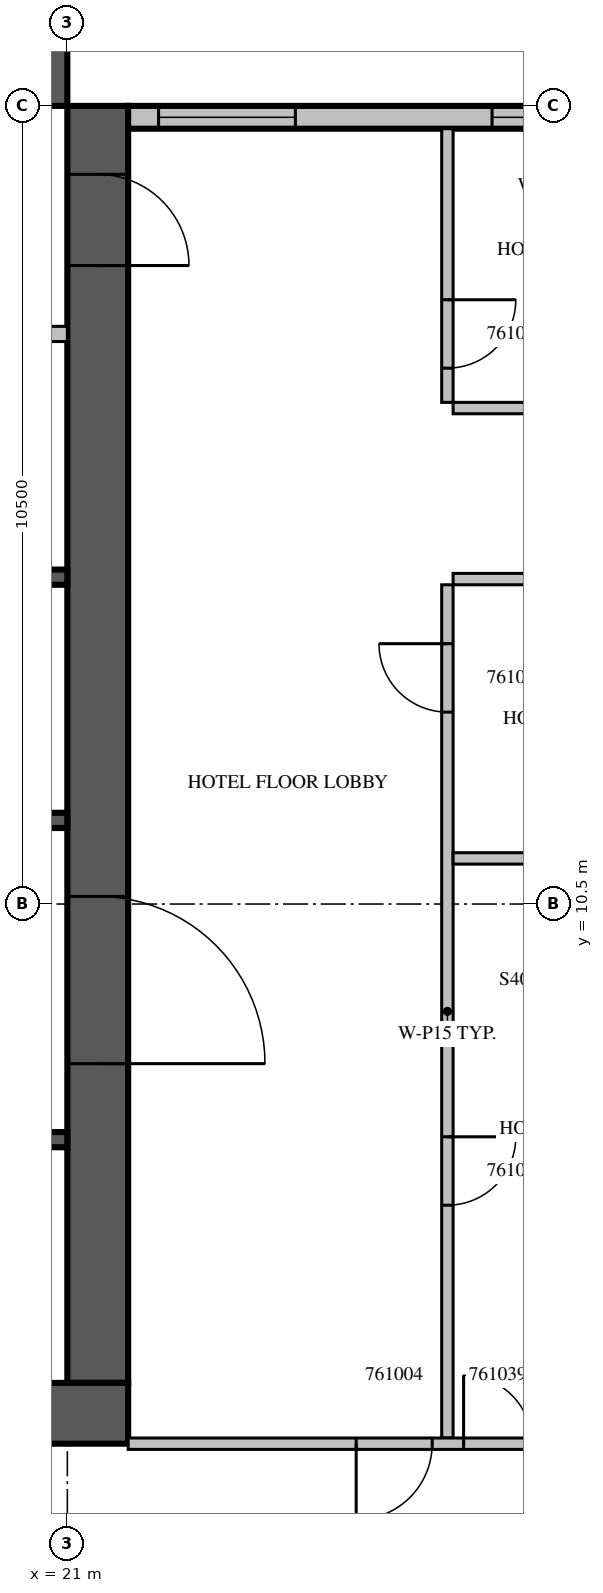
"""IFC4 building model, lengths in metres.
Left out: names, types, materials, properties, quantities, classifications, styles, units other than length and angle.
Written with IfcOpenShell. Run it as: python <this file> out.ifc"""

import sys

from ifc_helpers import new_model, si_unit, direction, frame, frame_2d, origin, place, context, subcontext, project, spatial, rectangle, extrude, source, transform, mapped, element, fill, save


model = new_model("IFC4")
c1 = context("Model", 3, precision=1e-05, world=origin(), true_north=direction((0.0, 1.0)))
c2 = subcontext(c1, "Body", "Model", "MODEL_VIEW")
j1 = project(units=[si_unit("LENGTHUNIT", "METRE"), si_unit("PLANEANGLEUNIT", "RADIAN")], contexts=[c1])
p1 = place(None, origin())
s1 = spatial("IfcSite", under=j1, at=p1, CompositionType="ELEMENT")
p2 = place(p1, origin())
s2 = spatial("IfcBuilding", under=s1, at=p2, CompositionType="ELEMENT")
p3 = place(p2, frame((0.0, 0.0, 265.2)))
s3 = spatial("IfcBuildingStorey", under=s2, at=p3, CompositionType="ELEMENT", Elevation=265.2)
m1 = source(origin(), c2, "Body", "SweptSolid", [
    extrude(rectangle(XDim=16.8, YDim=0.8, at=frame_2d((8.4, 0.0))), origin(), (0.0, 0.0, 1.0), 3.8),
])
p4 = place(p3, frame((21.4, 4.2, 0.0), z_axis=(0.0, 0.0, 1.0), x_axis=(0.0, 1.0, 0.0)))
e1 = element("IfcWall", 1, at=p4, inside=s3, PredefinedType="SHEAR", context=c2, shape_type="MappedRepresentation", body=[
    mapped(m1, transform((0.0, 0.0, 0.0), scale=1.0)),
])
m2 = source(origin(), c2, "Body", "SweptSolid", [
    extrude(rectangle(XDim=2.2, YDim=2.1, at=frame_2d((1.1, 1.05))), frame((0.0, 0.41, 0.0), z_axis=(0.0, -1.0, 0.0), x_axis=(1.0, 0.0, 0.0)), (0.0, 0.0, 1.0), 0.82),
])
p5 = place(p4, frame((4.2, 0.0, 0.0)))
e2 = element("IfcOpeningElement", 2, at=p5, cuts=e1, PredefinedType="OPENING", context=c2, shape_type="MappedRepresentation", body=[
    mapped(m2, transform((0.0, 0.0, 0.0), scale=1.0)),
])
m3 = source(origin(), c2, "Body", "SweptSolid", [
    extrude(rectangle(XDim=1.2, YDim=2.1, at=frame_2d((0.6, 1.05))), frame((0.0, 0.41, 0.0), z_axis=(0.0, -1.0, 0.0), x_axis=(1.0, 0.0, 0.0)), (0.0, 0.0, 1.0), 0.82),
])
p6 = place(p4, frame((14.7, 0.0, 0.0)))
e3 = element("IfcOpeningElement", 3, at=p6, cuts=e1, PredefinedType="OPENING", context=c2, shape_type="MappedRepresentation", body=[
    mapped(m3, transform((0.0, 0.0, 0.0), scale=1.0)),
])
m4 = source(origin(), c2, "Body", "SweptSolid", [
    extrude(rectangle(XDim=17.6, YDim=0.8, at=frame_2d((8.8, 0.0))), origin(), (0.0, 0.0, 1.0), 3.8),
])
p7 = place(p3, frame((4.2, 3.8, 0.0), z_axis=(0.0, 0.0, 1.0), x_axis=(1.0, 0.0, 0.0)))
e4 = element("IfcWall", 4, at=p7, inside=s3, PredefinedType="SHEAR", context=c2, shape_type="MappedRepresentation", body=[
    mapped(m4, transform((0.0, 0.0, 0.0), scale=1.0)),
])
m5 = source(origin(), c2, "Body", "SweptSolid", [
    extrude(rectangle(XDim=0.9, YDim=2.1, at=frame_2d((0.45, 1.05))), frame((0.0, 0.41, 0.0), z_axis=(0.0, -1.0, 0.0), x_axis=(1.0, 0.0, 0.0)), (0.0, 0.0, 1.0), 0.82),
])
p8 = place(p7, frame((12.75, 0.0, 0.0)))
e5 = element("IfcOpeningElement", 5, at=p8, cuts=e4, PredefinedType="OPENING", context=c2, shape_type="MappedRepresentation", body=[
    mapped(m5, transform((0.0, 0.0, 0.0), scale=1.0)),
])
p9 = place(p3, frame((4.2, 21.4, 0.0), z_axis=(0.0, 0.0, 1.0), x_axis=(1.0, 0.0, 0.0)))
e6 = element("IfcWall", 6, at=p9, inside=s3, PredefinedType="SHEAR", context=c2, shape_type="MappedRepresentation", body=[
    mapped(m1, transform((0.0, 0.0, 0.0), scale=1.0)),
])
p10 = place(p9, frame((6.2, 0.0, 0.0)))
e7 = element("IfcOpeningElement", 7, at=p10, cuts=e6, PredefinedType="OPENING", context=c2, shape_type="MappedRepresentation", body=[
    mapped(m3, transform((0.0, 0.0, 0.0), scale=1.0)),
])
m6 = source(origin(), c2, "Body", "SweptSolid", [
    extrude(rectangle(XDim=7.2, YDim=0.3, at=frame_2d((3.6, 0.0))), origin(), (0.0, 0.0, 1.0), 3.4),
])
p11 = place(p3, frame((29.0, 20.85, 0.0), z_axis=(0.0, 0.0, 1.0), x_axis=(-1.0, 0.0, 0.0)))
e8 = element("IfcWall", 8, at=p11, inside=s3, PredefinedType="STANDARD", context=c2, shape_type="MappedRepresentation", body=[
    mapped(m6, transform((0.0, 0.0, 0.0), scale=1.0)),
])
m7 = source(origin(), c2, "Body", "SweptSolid", [
    extrude(rectangle(XDim=1.8, YDim=2.3, at=frame_2d((0.9, 1.15))), frame((0.0, 0.16, 0.0), z_axis=(0.0, -1.0, 0.0), x_axis=(1.0, 0.0, 0.0)), (0.0, 0.0, 1.0), 0.32),
])
p12 = place(p11, frame((0.613, 0.0, 0.6)))
e9 = element("IfcOpeningElement", 9, at=p12, cuts=e8, PredefinedType="OPENING", context=c2, shape_type="MappedRepresentation", body=[
    mapped(m7, transform((0.0, 0.0, 0.0), scale=1.0)),
])
p13 = place(p11, frame((5.0, 0.0, 0.6)))
e10 = element("IfcOpeningElement", 10, at=p13, cuts=e8, PredefinedType="OPENING", context=c2, shape_type="MappedRepresentation", body=[
    mapped(m7, transform((0.0, 0.0, 0.0), scale=1.0)),
])
m8 = source(origin(), c2, "Body", "SweptSolid", [
    extrude(rectangle(XDim=2.4, YDim=0.2, at=frame_2d((1.2, 0.0))), origin(), (0.0, 0.0, 1.0), 3.8),
])
p14 = place(p3, frame((18.6, 7.4, 0.0), z_axis=(0.0, 0.0, 1.0), x_axis=(1.0, 0.0, 0.0)))
e11 = element("IfcWall", 11, at=p14, inside=s3, PredefinedType="SOLIDWALL", context=c2, shape_type="MappedRepresentation", body=[
    mapped(m8, transform((0.0, 0.0, 0.0), scale=1.0)),
])
m9 = source(origin(), c2, "Body", "SweptSolid", [
    extrude(rectangle(XDim=9.6, YDim=0.2, at=frame_2d((4.8, 0.0))), origin(), (0.0, 0.0, 1.0), 3.8),
])
p15 = place(p3, frame((11.4, 11.6, 0.0), z_axis=(0.0, 0.0, 1.0), x_axis=(1.0, 0.0, 0.0)))
e12 = element("IfcWall", 12, at=p15, inside=s3, PredefinedType="SOLIDWALL", context=c2, shape_type="MappedRepresentation", body=[
    mapped(m9, transform((0.0, 0.0, 0.0), scale=1.0)),
])
p16 = place(p3, frame((11.4, 14.8, 0.0), z_axis=(0.0, 0.0, 1.0), x_axis=(1.0, 0.0, 0.0)))
e13 = element("IfcWall", 13, at=p16, inside=s3, PredefinedType="SOLIDWALL", context=c2, shape_type="MappedRepresentation", body=[
    mapped(m9, transform((0.0, 0.0, 0.0), scale=1.0)),
])
m10 = source(origin(), c2, "Body", "SweptSolid", [
    extrude(rectangle(XDim=1.1, YDim=2.1, at=frame_2d((0.55, 1.05))), frame((0.0, 0.11, 0.0), z_axis=(0.0, -1.0, 0.0), x_axis=(1.0, 0.0, 0.0)), (0.0, 0.0, 1.0), 0.22),
])
p17 = place(p16, frame((3.05, 0.0, 0.0)))
e14 = element("IfcOpeningElement", 14, at=p17, cuts=e13, PredefinedType="OPENING", context=c2, shape_type="MappedRepresentation", body=[
    mapped(m10, transform((0.0, 0.0, 0.0), scale=1.0)),
])
p18 = place(p16, frame((5.45, 0.0, 0.0)))
e15 = element("IfcOpeningElement", 15, at=p18, cuts=e13, PredefinedType="OPENING", context=c2, shape_type="MappedRepresentation", body=[
    mapped(m10, transform((0.0, 0.0, 0.0), scale=1.0)),
])
p19 = place(p16, frame((7.85, 0.0, 0.0)))
e16 = element("IfcOpeningElement", 16, at=p19, cuts=e13, PredefinedType="OPENING", context=c2, shape_type="MappedRepresentation", body=[
    mapped(m10, transform((0.0, 0.0, 0.0), scale=1.0)),
])
m11 = source(origin(), c2, "Body", "SweptSolid", [
    extrude(rectangle(XDim=11.45, YDim=0.2, at=frame_2d((5.725, 0.0))), origin(), (0.0, 0.0, 1.0), 3.4),
])
p20 = place(p3, frame((9.55, 18.0, 0.0), z_axis=(0.0, 0.0, 1.0), x_axis=(1.0, 0.0, 0.0)))
e17 = element("IfcWall", 17, at=p20, inside=s3, PredefinedType="PARTITIONING", context=c2, shape_type="MappedRepresentation", body=[
    mapped(m11, transform((0.0, 0.0, 0.0), scale=1.0)),
])
m12 = source(origin(), c2, "Body", "SweptSolid", [
    extrude(rectangle(XDim=0.9, YDim=2.1, at=frame_2d((0.45, 1.05))), frame((0.0, 0.11, 0.0), z_axis=(0.0, -1.0, 0.0), x_axis=(1.0, 0.0, 0.0)), (0.0, 0.0, 1.0), 0.22),
])
p21 = place(p20, frame((0.375, 0.0, 0.0)))
e18 = element("IfcOpeningElement", 18, at=p21, cuts=e17, PredefinedType="OPENING", context=c2, shape_type="MappedRepresentation", body=[
    mapped(m12, transform((0.0, 0.0, 0.0), scale=1.0)),
])
p22 = place(p20, frame((1.7, 0.0, 0.0)))
e19 = element("IfcOpeningElement", 19, at=p22, cuts=e17, PredefinedType="OPENING", context=c2, shape_type="MappedRepresentation", body=[
    mapped(m12, transform((0.0, 0.0, 0.0), scale=1.0)),
])
p23 = place(p20, frame((3.075, 0.0, 0.0)))
e20 = element("IfcOpeningElement", 20, at=p23, cuts=e17, PredefinedType="OPENING", context=c2, shape_type="MappedRepresentation", body=[
    mapped(m12, transform((0.0, 0.0, 0.0), scale=1.0)),
])
p24 = place(p20, frame((7.35, 0.0, 0.0)))
e21 = element("IfcOpeningElement", 21, at=p24, cuts=e17, PredefinedType="OPENING", context=c2, shape_type="MappedRepresentation", body=[
    mapped(m10, transform((0.0, 0.0, 0.0), scale=1.0)),
])
m13 = source(origin(), c2, "Body", "SweptSolid", [
    extrude(rectangle(XDim=11.225, YDim=0.15, at=frame_2d((5.612, 0.0))), origin(), (0.0, 0.0, 1.0), 3.4),
])
p25 = place(p3, frame((26.0, 14.7, 0.0), z_axis=(0.0, 0.0, 1.0), x_axis=(0.0, -1.0, 0.0)))
e22 = element("IfcWall", 22, at=p25, inside=s3, PredefinedType="PARTITIONING", context=c2, shape_type="MappedRepresentation", body=[
    mapped(m13, transform((0.0, 0.0, 0.0), scale=1.0)),
])
m14 = source(origin(), c2, "Body", "SweptSolid", [
    extrude(rectangle(XDim=0.9, YDim=2.1, at=frame_2d((0.45, 1.05))), frame((0.0, 0.085, 0.0), z_axis=(0.0, -1.0, 0.0), x_axis=(1.0, 0.0, 0.0)), (0.0, 0.0, 1.0), 0.17),
])
p26 = place(p25, frame((7.263, 0.0, 0.0)))
e23 = element("IfcOpeningElement", 23, at=p26, cuts=e22, PredefinedType="OPENING", context=c2, shape_type="MappedRepresentation", body=[
    mapped(m14, transform((0.0, 0.0, 0.0), scale=1.0)),
])
p27 = place(p25, frame((0.775, 0.0, 0.0)))
e24 = element("IfcOpeningElement", 24, at=p27, cuts=e22, PredefinedType="OPENING", context=c2, shape_type="MappedRepresentation", body=[
    mapped(m14, transform((0.0, 0.0, 0.0), scale=1.0)),
])
m15 = source(origin(), c2, "Body", "SweptSolid", [
    extrude(rectangle(XDim=3.6, YDim=0.15, at=frame_2d((1.8, 0.0))), origin(), (0.0, 0.0, 1.0), 3.4),
])
p28 = place(p3, frame((26.0, 20.7, 0.0), z_axis=(0.0, 0.0, 1.0), x_axis=(0.0, -1.0, 0.0)))
e25 = element("IfcWall", 25, at=p28, inside=s3, PredefinedType="PARTITIONING", context=c2, shape_type="MappedRepresentation", body=[
    mapped(m15, transform((0.0, 0.0, 0.0), scale=1.0)),
])
p29 = place(p28, frame((2.25, 0.0, 0.0)))
e26 = element("IfcOpeningElement", 26, at=p29, cuts=e25, PredefinedType="OPENING", context=c2, shape_type="MappedRepresentation", body=[
    mapped(m14, transform((0.0, 0.0, 0.0), scale=1.0)),
])
m16 = source(origin(), c2, "Body", "SweptSolid", [
    extrude(rectangle(XDim=3.25, YDim=0.15, at=frame_2d((1.625, 0.0))), origin(), (0.0, 0.0, 1.0), 3.4),
])
for number, where, z_axis, x_axis in (
    (27, (29.325, 11.1, 0.0), (0.0, 0.0, 1.0), (-1.0, 0.0, 0.0)),
    (28, (29.325, 14.775, 0.0), (0.0, 0.0, 1.0), (-1.0, 0.0, 0.0)),
    (29, (26.075, 17.025, 0.0), (0.0, 0.0, 1.0), (1.0, 0.0, 0.0)),
):
    element("IfcWall", number, at=place(p3, frame(where, z_axis=z_axis, x_axis=x_axis)), inside=s3, PredefinedType="PARTITIONING", context=c2, shape_type="MappedRepresentation", body=[
        mapped(m16, transform((0.0, 0.0, 0.0), scale=1.0)),
    ])
m17 = source(origin(), c2, "Body", "SweptSolid", [
    extrude(rectangle(XDim=7.525, YDim=0.15, at=frame_2d((3.763, 0.0))), origin(), (0.0, 0.0, 1.0), 3.4),
])
p30 = place(p3, frame((21.8, 3.4, 0.0), z_axis=(0.0, 0.0, 1.0), x_axis=(1.0, 0.0, 0.0)))
e30 = element("IfcWall", 30, at=p30, inside=s3, PredefinedType="PARTITIONING", context=c2, shape_type="MappedRepresentation", body=[
    mapped(m17, transform((0.0, 0.0, 0.0), scale=1.0)),
])
m18 = source(origin(), c2, "Body", "SweptSolid", [
    extrude(rectangle(XDim=1.0, YDim=2.1, at=frame_2d((0.5, 1.05))), frame((0.0, 0.085, 0.0), z_axis=(0.0, -1.0, 0.0), x_axis=(1.0, 0.0, 0.0)), (0.0, 0.0, 1.0), 0.17),
])
p31 = place(p30, frame((3.0, 0.0, 0.0)))
e31 = element("IfcOpeningElement", 31, at=p31, cuts=e30, PredefinedType="OPENING", context=c2, shape_type="MappedRepresentation", body=[
    mapped(m18, transform((0.0, 0.0, 0.0), scale=1.0)),
])
p32 = place(p30, frame((4.413, 0.0, 0.0)))
e32 = element("IfcOpeningElement", 32, at=p32, cuts=e30, PredefinedType="OPENING", context=c2, shape_type="MappedRepresentation", body=[
    mapped(m14, transform((0.0, 0.0, 0.0), scale=1.0)),
])
m19 = source(origin(), c2, "Body", "SweptSolid", [
    extrude(rectangle(XDim=1.8, YDim=2.3, at=frame_2d((0.9, 1.15))), frame((0.0, 0.03, 0.0), z_axis=(0.0, -1.0, 0.0), x_axis=(1.0, 0.0, 0.0)), (0.0, 0.0, 1.0), 0.06),
])
p33 = place(p12, origin())
e33 = element("IfcWindow", 33, at=p33, inside=s3, PartitioningType="SINGLE_PANEL", PredefinedType="WINDOW", context=c2, shape_type="MappedRepresentation", body=[
    mapped(m19, transform((0.0, 0.0, 0.0), scale=1.0)),
])
fill(e9, e33)
p34 = place(p13, origin())
e34 = element("IfcWindow", 34, at=p34, inside=s3, PartitioningType="SINGLE_PANEL", PredefinedType="WINDOW", context=c2, shape_type="MappedRepresentation", body=[
    mapped(m19, transform((0.0, 0.0, 0.0), scale=1.0)),
])
fill(e10, e34)
m20 = source(origin(), c2, "Body", "SweptSolid", [
    extrude(rectangle(XDim=2.2, YDim=2.1, at=frame_2d((1.1, 1.05))), frame((0.0, 0.025, 0.0), z_axis=(0.0, -1.0, 0.0), x_axis=(1.0, 0.0, 0.0)), (0.0, 0.0, 1.0), 0.05),
])
p35 = place(p5, origin())
e35 = element("IfcDoor", 35, at=p35, inside=s3, OperationType="DOUBLE_DOOR_SINGLE_SWING", PredefinedType="DOOR", context=c2, shape_type="MappedRepresentation", body=[
    mapped(m20, transform((0.0, 0.0, 0.0), scale=1.0)),
])
fill(e2, e35)
m21 = source(origin(), c2, "Body", "SweptSolid", [
    extrude(rectangle(XDim=1.2, YDim=2.1, at=frame_2d((0.6, 1.05))), frame((0.0, 0.025, 0.0), z_axis=(0.0, -1.0, 0.0), x_axis=(1.0, 0.0, 0.0)), (0.0, 0.0, 1.0), 0.05),
])
p36 = place(p6, origin())
e36 = element("IfcDoor", 36, at=p36, inside=s3, OperationType="SINGLE_SWING_RIGHT", PredefinedType="DOOR", context=c2, shape_type="MappedRepresentation", body=[
    mapped(m21, transform((0.0, 0.0, 0.0), scale=1.0)),
])
fill(e3, e36)
m22 = source(origin(), c2, "Body", "SweptSolid", [
    extrude(rectangle(XDim=0.9, YDim=2.1, at=frame_2d((0.45, 1.05))), frame((0.0, 0.025, 0.0), z_axis=(0.0, -1.0, 0.0), x_axis=(1.0, 0.0, 0.0)), (0.0, 0.0, 1.0), 0.05),
])
p37 = place(p26, origin())
e37 = element("IfcDoor", 37, at=p37, inside=s3, OperationType="SINGLE_SWING_LEFT", PredefinedType="DOOR", context=c2, shape_type="MappedRepresentation", body=[
    mapped(m22, transform((0.0, 0.0, 0.0), scale=1.0)),
])
fill(e23, e37)
p38 = place(p27, origin())
e38 = element("IfcDoor", 38, at=p38, inside=s3, OperationType="SINGLE_SWING_RIGHT", PredefinedType="DOOR", context=c2, shape_type="MappedRepresentation", body=[
    mapped(m22, transform((0.0, 0.0, 0.0), scale=1.0)),
])
fill(e24, e38)
p39 = place(p29, origin())
e39 = element("IfcDoor", 39, at=p39, inside=s3, OperationType="SINGLE_SWING_LEFT", PredefinedType="DOOR", context=c2, shape_type="MappedRepresentation", body=[
    mapped(m22, transform((0.0, 0.0, 0.0), scale=1.0)),
])
fill(e26, e39)
m23 = source(origin(), c2, "Body", "SweptSolid", [
    extrude(rectangle(XDim=1.0, YDim=2.1, at=frame_2d((0.5, 1.05))), frame((0.0, 0.025, 0.0), z_axis=(0.0, -1.0, 0.0), x_axis=(1.0, 0.0, 0.0)), (0.0, 0.0, 1.0), 0.05),
])
p40 = place(p31, origin())
e40 = element("IfcDoor", 40, at=p40, inside=s3, OperationType="SINGLE_SWING_RIGHT", PredefinedType="DOOR", context=c2, shape_type="MappedRepresentation", body=[
    mapped(m23, transform((0.0, 0.0, 0.0), scale=1.0)),
])
fill(e31, e40)
p41 = place(p32, origin())
e41 = element("IfcDoor", 41, at=p41, inside=s3, OperationType="SINGLE_SWING_LEFT", PredefinedType="DOOR", context=c2, shape_type="MappedRepresentation", body=[
    mapped(m22, transform((0.0, 0.0, 0.0), scale=1.0)),
])
fill(e32, e41)
save(model, sys.argv[1])
